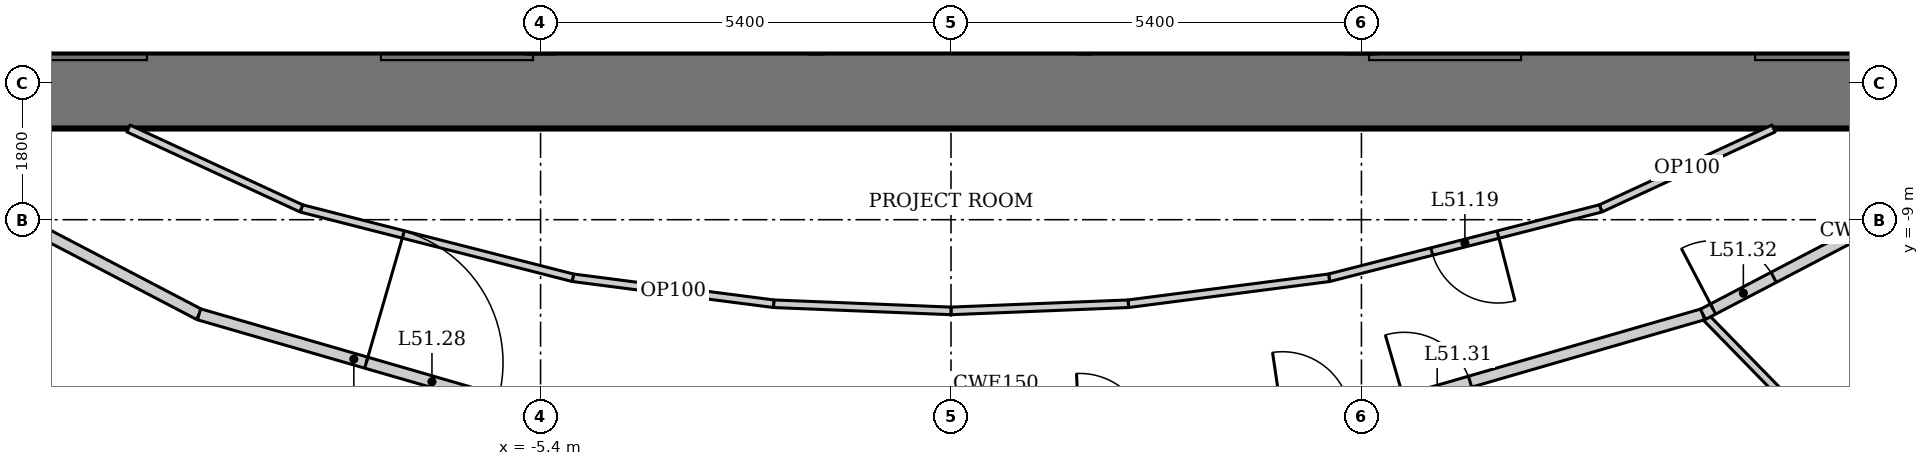
"""IFC4 building model, lengths in metres.
Left out: names, types, materials, properties, quantities, classifications, styles, units other than length and angle.
Written with IfcOpenShell. Run it as: python <this file> out.ifc"""

import sys

from ifc_helpers import new_model, si_unit, direction, frame, frame_2d, origin, place, context, subcontext, project, spatial, rectangle, extrude, element, fill, save


model = new_model("IFC4")
c1 = context("Model", 3, precision=1e-05, world=origin(), true_north=direction((0.0, 1.0)))
c2 = subcontext(c1, "Body", "Model", "MODEL_VIEW")
j1 = project(units=[si_unit("LENGTHUNIT", "METRE"), si_unit("PLANEANGLEUNIT", "RADIAN")], contexts=[c1])
p1 = place(None, origin())
s1 = spatial("IfcSite", under=j1, at=p1, CompositionType="ELEMENT")
p2 = place(p1, origin())
s2 = spatial("IfcBuilding", under=s1, at=p2, CompositionType="ELEMENT")
p3 = place(p2, frame((0.0, 0.0, 220.0)))
s3 = spatial("IfcBuildingStorey", under=s2, at=p3, CompositionType="ELEMENT", Elevation=220.0)
p4 = place(p3, frame((-12.2, -7.3, 0.0), z_axis=(0.0, 0.0, 1.0), x_axis=(1.0, 0.0, 0.0)))
e1 = element("IfcWall", 1, at=p4, inside=s3, PredefinedType="SHEAR", context=c2, shape_type="SweptSolid", body=[
    extrude(rectangle(XDim=24.4, YDim=1.0, at=frame_2d((12.2, 0.0))), origin(), (0.0, 0.0, 1.0), 4.2),
])
for number, where, z_axis, x_axis in (
    (2, (-1.767, -2.6, 0.0), (0.0, 0.0, 1.0), (0.0, -1.0, 0.0)),
    (3, (1.767, -2.6, 0.0), (0.0, 0.0, 1.0), (0.0, -1.0, 0.0)),
):
    element("IfcWall", number, at=place(p3, frame(where, z_axis=z_axis, x_axis=x_axis)), inside=s3, PredefinedType="SOLIDWALL", context=c2, shape_type="SweptSolid", body=[
        extrude(rectangle(XDim=4.2, YDim=0.2, at=frame_2d((2.1, 0.0))), origin(), (0.0, 0.0, 1.0), 4.2),
    ])
p5 = place(p3, frame((15.709, -16.199, 0.0), z_axis=(0.0, 0.0, 1.0), x_axis=(-0.69875697861, 0.715359129978, 0.0)))
e4 = element("IfcWall", 4, at=p5, inside=s3, PredefinedType="PARTITIONING", context=c2, shape_type="SweptSolid", body=[
    extrude(rectangle(XDim=8.323, YDim=0.1, at=frame_2d((4.162, 0.0))), origin(), (0.0, 0.0, 1.0), 3.41),
])
p6 = place(p3, frame((-14.089, -8.051, 0.0), z_axis=(0.0, 0.0, 1.0), x_axis=(0.886174439647, -0.463351769735, 0.0)))
e5 = element("IfcWall", 5, at=p6, inside=s3, PredefinedType="PARTITIONING", context=c2, shape_type="SweptSolid", body=[
    extrude(rectangle(XDim=4.735, YDim=0.15, at=frame_2d((2.367, 0.0))), origin(), (0.0, 0.0, 1.0), 4.05),
])
p7 = place(p3, frame((-9.893, -10.245, 0.0), z_axis=(0.0, 0.0, 1.0), x_axis=(0.960614838378, -0.27788330696, 0.0)))
e6 = element("IfcWall", 6, at=p7, inside=s3, PredefinedType="PARTITIONING", context=c2, shape_type="SweptSolid", body=[
    extrude(rectangle(XDim=4.24, YDim=0.15, at=frame_2d((2.12, 0.0))), origin(), (0.0, 0.0, 1.0), 4.05),
])
p8 = place(p7, frame((2.29, 0.0, 0.0)))
e7 = element("IfcOpeningElement", 7, at=p8, cuts=e6, PredefinedType="OPENING", context=c2, shape_type="SweptSolid", body=[
    extrude(rectangle(XDim=1.8, YDim=2.1, at=frame_2d((0.9, 1.05))), frame((0.0, 0.085, 0.0), z_axis=(0.0, -1.0, 0.0), x_axis=(1.0, 0.0, 0.0)), (0.0, 0.0, 1.0), 0.17),
])
p9 = place(p3, frame((5.82, -11.423, 0.0), z_axis=(0.0, 0.0, 1.0), x_axis=(0.960614838378, 0.27788330696, 0.0)))
e8 = element("IfcWall", 8, at=p9, inside=s3, PredefinedType="PARTITIONING", context=c2, shape_type="SweptSolid", body=[
    extrude(rectangle(XDim=4.24, YDim=0.15, at=frame_2d((2.12, 0.0))), origin(), (0.0, 0.0, 1.0), 4.05),
])
p10 = place(p9, frame((0.15, 0.0, 0.0)))
e9 = element("IfcOpeningElement", 9, at=p10, cuts=e8, PredefinedType="OPENING", context=c2, shape_type="SweptSolid", body=[
    extrude(rectangle(XDim=0.9, YDim=2.1, at=frame_2d((0.45, 1.05))), frame((0.0, 0.085, 0.0), z_axis=(0.0, -1.0, 0.0), x_axis=(1.0, 0.0, 0.0)), (0.0, 0.0, 1.0), 0.17),
])
p11 = place(p3, frame((9.893, -10.245, 0.0), z_axis=(0.0, 0.0, 1.0), x_axis=(0.886174439647, 0.463351769735, 0.0)))
e10 = element("IfcWall", 10, at=p11, inside=s3, PredefinedType="PARTITIONING", context=c2, shape_type="SweptSolid", body=[
    extrude(rectangle(XDim=4.735, YDim=0.15, at=frame_2d((2.367, 0.0))), origin(), (0.0, 0.0, 1.0), 4.05),
])
p12 = place(p11, frame((0.15, 0.0, 0.0)))
e11 = element("IfcOpeningElement", 11, at=p12, cuts=e10, PredefinedType="OPENING", context=c2, shape_type="SweptSolid", body=[
    extrude(rectangle(XDim=0.9, YDim=2.1, at=frame_2d((0.45, 1.05))), frame((0.0, 0.085, 0.0), z_axis=(0.0, -1.0, 0.0), x_axis=(1.0, 0.0, 0.0)), (0.0, 0.0, 1.0), 0.17),
])
p13 = place(p3, frame((10.823, -7.8, 0.0), z_axis=(0.0, 0.0, 1.0), x_axis=(-0.907759689292, -0.419490579748, 0.0)))
e12 = element("IfcWall", 12, at=p13, inside=s3, PredefinedType="PARTITIONING", context=c2, shape_type="SweptSolid", body=[
    extrude(rectangle(XDim=2.506, YDim=0.1, at=frame_2d((1.253, 0.0))), origin(), (0.0, 0.0, 1.0), 4.05),
])
p14 = place(p3, frame((8.548, -8.851, 0.0), z_axis=(0.0, 0.0, 1.0), x_axis=(-0.968887312542, -0.247502273921, 0.0)))
e13 = element("IfcWall", 13, at=p14, inside=s3, PredefinedType="PARTITIONING", context=c2, shape_type="SweptSolid", body=[
    extrude(rectangle(XDim=3.687, YDim=0.1, at=frame_2d((1.844, 0.0))), origin(), (0.0, 0.0, 1.0), 4.05),
])
p15 = place(p14, frame((1.394, 0.0, 0.0)))
e14 = element("IfcOpeningElement", 14, at=p15, cuts=e13, PredefinedType="OPENING", context=c2, shape_type="SweptSolid", body=[
    extrude(rectangle(XDim=0.9, YDim=2.1, at=frame_2d((0.45, 1.05))), frame((0.0, 0.06, 0.0), z_axis=(0.0, -1.0, 0.0), x_axis=(1.0, 0.0, 0.0)), (0.0, 0.0, 1.0), 0.12),
])
p16 = place(p3, frame((4.975, -9.764, 0.0), z_axis=(0.0, 0.0, 1.0), x_axis=(-0.99173579163, -0.128296997624, 0.0)))
e15 = element("IfcWall", 15, at=p16, inside=s3, PredefinedType="PARTITIONING", context=c2, shape_type="SweptSolid", body=[
    extrude(rectangle(XDim=2.664, YDim=0.1, at=frame_2d((1.332, 0.0))), origin(), (0.0, 0.0, 1.0), 4.05),
])
for number, where, z_axis, x_axis in (
    (16, (2.333, -10.106, 0.0), (0.0, 0.0, 1.0), (-0.999, -0.04, 0.0)),
    (17, (0.0, -10.2, 0.0), (0.0, 0.0, 1.0), (-0.999, 0.04, 0.0)),
):
    element("IfcWall", number, at=place(p3, frame(where, z_axis=z_axis, x_axis=x_axis)), inside=s3, PredefinedType="PARTITIONING", context=c2, shape_type="SweptSolid", body=[
        extrude(rectangle(XDim=2.335, YDim=0.1, at=frame_2d((1.167, 0.0))), origin(), (0.0, 0.0, 1.0), 4.05),
    ])
p17 = place(p3, frame((-2.333, -10.106, 0.0), z_axis=(0.0, 0.0, 1.0), x_axis=(-0.99173579163, 0.128296997624, 0.0)))
e18 = element("IfcWall", 18, at=p17, inside=s3, PredefinedType="PARTITIONING", context=c2, shape_type="SweptSolid", body=[
    extrude(rectangle(XDim=2.664, YDim=0.1, at=frame_2d((1.332, 0.0))), origin(), (0.0, 0.0, 1.0), 4.05),
])
p18 = place(p3, frame((-4.975, -9.764, 0.0), z_axis=(0.0, 0.0, 1.0), x_axis=(-0.968887312542, 0.247502273921, 0.0)))
e19 = element("IfcWall", 19, at=p18, inside=s3, PredefinedType="PARTITIONING", context=c2, shape_type="SweptSolid", body=[
    extrude(rectangle(XDim=3.687, YDim=0.1, at=frame_2d((1.844, 0.0))), origin(), (0.0, 0.0, 1.0), 4.05),
])
p19 = place(p3, frame((-8.548, -8.851, 0.0), z_axis=(0.0, 0.0, 1.0), x_axis=(-0.907759689292, 0.419490579748, 0.0)))
e20 = element("IfcWall", 20, at=p19, inside=s3, PredefinedType="PARTITIONING", context=c2, shape_type="SweptSolid", body=[
    extrude(rectangle(XDim=2.506, YDim=0.1, at=frame_2d((1.253, 0.0))), origin(), (0.0, 0.0, 1.0), 4.05),
])
p20 = place(p15, origin())
e21 = element("IfcDoor", 21, at=p20, inside=s3, OperationType="SINGLE_SWING_LEFT", PredefinedType="DOOR", context=c2, shape_type="SweptSolid", body=[
    extrude(rectangle(XDim=0.9, YDim=2.1, at=frame_2d((0.45, 1.05))), frame((0.0, 0.025, 0.0), z_axis=(0.0, -1.0, 0.0), x_axis=(1.0, 0.0, 0.0)), (0.0, 0.0, 1.0), 0.05),
])
fill(e14, e21)
p21 = place(p8, origin())
e22 = element("IfcDoor", 22, at=p21, inside=s3, OperationType="DOUBLE_DOOR_DOUBLE_SWING", PredefinedType="DOOR", context=c2, shape_type="SweptSolid", body=[
    extrude(rectangle(XDim=1.8, YDim=2.1, at=frame_2d((0.9, 1.05))), frame((0.0, 0.025, 0.0), z_axis=(0.0, -1.0, 0.0), x_axis=(1.0, 0.0, 0.0)), (0.0, 0.0, 1.0), 0.05),
])
fill(e7, e22)
p22 = place(p10, origin())
e23 = element("IfcDoor", 23, at=p22, inside=s3, OperationType="SINGLE_SWING_LEFT", PredefinedType="DOOR", context=c2, shape_type="SweptSolid", body=[
    extrude(rectangle(XDim=0.9, YDim=2.1, at=frame_2d((0.45, 1.05))), frame((0.0, 0.025, 0.0), z_axis=(0.0, -1.0, 0.0), x_axis=(1.0, 0.0, 0.0)), (0.0, 0.0, 1.0), 0.05),
])
fill(e9, e23)
p23 = place(p12, origin())
e24 = element("IfcDoor", 24, at=p23, inside=s3, OperationType="SINGLE_SWING_LEFT", PredefinedType="DOOR", context=c2, shape_type="SweptSolid", body=[
    extrude(rectangle(XDim=0.9, YDim=2.1, at=frame_2d((0.45, 1.05))), frame((0.0, 0.025, 0.0), z_axis=(0.0, -1.0, 0.0), x_axis=(1.0, 0.0, 0.0)), (0.0, 0.0, 1.0), 0.05),
])
fill(e11, e24)
save(model, sys.argv[1])
